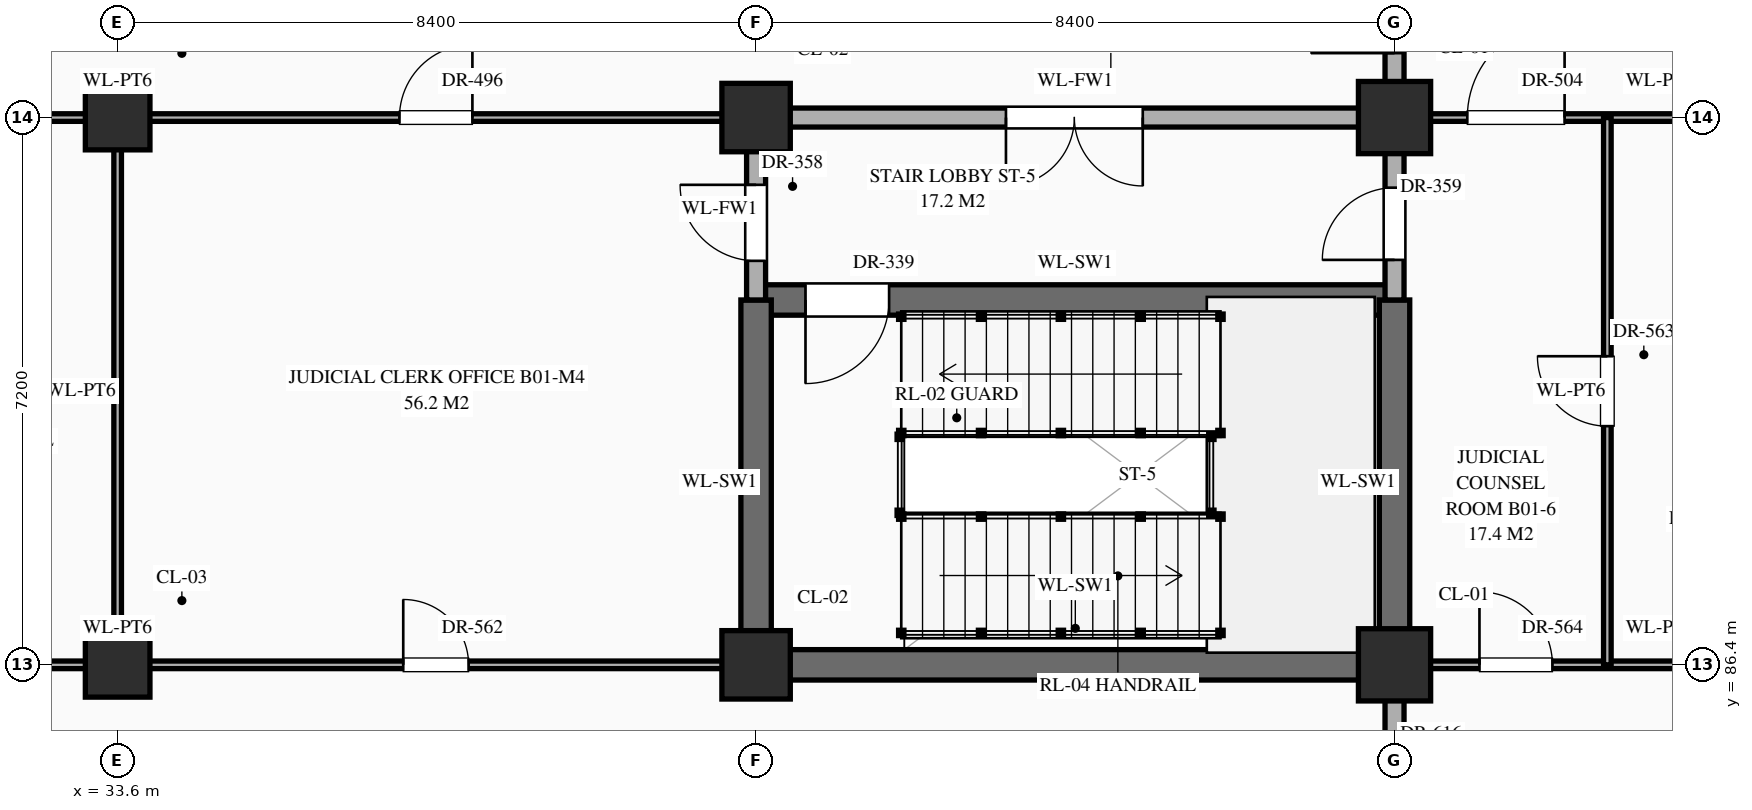
"""IFC4 building model, lengths in metres.
Left out: names, types, materials, properties, quantities, classifications, styles, units other than length and angle.
Written with IfcOpenShell. Run it as: python <this file> out.ifc"""

import sys

from ifc_helpers import new_model, si_unit, direction, frame, frame_2d, origin, origin_2d, place, context, subcontext, project, spatial, rectangle, extrude, element, fill, save


model = new_model("IFC4")
c1 = context("Model", 3, precision=1e-05, world=origin(), true_north=direction((0.0, 1.0)))
c2 = subcontext(c1, "Body", "Model", "MODEL_VIEW")
j1 = project(units=[si_unit("LENGTHUNIT", "METRE"), si_unit("PLANEANGLEUNIT", "RADIAN")], contexts=[c1])
p1 = place(None, origin())
s1 = spatial("IfcSite", under=j1, at=p1, CompositionType="ELEMENT")
p2 = place(p1, origin())
s2 = spatial("IfcBuilding", under=s1, at=p2, CompositionType="ELEMENT")
p3 = place(p2, frame((0.0, 0.0, -5.4)))
s3 = spatial("IfcBuildingStorey", under=s2, at=p3, CompositionType="ELEMENT", Elevation=-5.4)
for number, where, z_axis, x_axis in (
    (1, (33.6, 86.4, 0.0), (0.0, 0.0, 1.0), (1.0, 0.0, 0.0)),
    (2, (33.6, 93.6, 0.0), (0.0, 0.0, 1.0), (1.0, 0.0, 0.0)),
):
    element("IfcColumn", number, at=place(p3, frame(where, z_axis=z_axis, x_axis=x_axis)), inside=s3, PredefinedType="COLUMN", context=c2, shape_type="SweptSolid", body=[
        extrude(rectangle(XDim=0.85, YDim=0.85, at=origin_2d()), origin(), (0.0, 0.0, 1.0), 5.4),
    ])
for number, where, z_axis, x_axis in (
    (3, (42.0, 86.4, 0.0), (0.0, 0.0, 1.0), (1.0, 0.0, 0.0)),
    (4, (42.0, 93.6, 0.0), (0.0, 0.0, 1.0), (1.0, 0.0, 0.0)),
):
    element("IfcColumn", number, at=place(p3, frame(where, z_axis=z_axis, x_axis=x_axis)), inside=s3, PredefinedType="COLUMN", context=c2, shape_type="SweptSolid", body=[
        extrude(rectangle(XDim=0.9, YDim=0.9, at=origin_2d()), origin(), (0.0, 0.0, 1.0), 5.4),
    ])
for number, where, z_axis, x_axis in (
    (5, (50.4, 86.4, 0.0), (0.0, 0.0, 1.0), (1.0, 0.0, 0.0)),
    (6, (50.4, 93.6, 0.0), (0.0, 0.0, 1.0), (1.0, 0.0, 0.0)),
):
    element("IfcColumn", number, at=place(p3, frame(where, z_axis=z_axis, x_axis=x_axis)), inside=s3, PredefinedType="COLUMN", context=c2, shape_type="SweptSolid", body=[
        extrude(rectangle(XDim=0.95, YDim=0.95, at=origin_2d()), origin(), (0.0, 0.0, 1.0), 5.4),
    ])
p4 = place(p3, frame((25.2, 86.4, 0.0), z_axis=(0.0, 0.0, 1.0), x_axis=(1.0, 0.0, 0.0)))
e7 = element("IfcWall", 7, at=p4, inside=s3, PredefinedType="STANDARD", context=c2, shape_type="SweptSolid", body=[
    extrude(rectangle(XDim=16.8, YDim=0.1, at=frame_2d((8.4, 0.0))), origin(), (0.0, 0.0, 1.0), 4.25),
])
p5 = place(p4, frame((1.075, 0.0, 0.0)))
e8 = element("IfcOpeningElement", 8, at=p5, cuts=e7, PredefinedType="OPENING", context=c2, shape_type="SweptSolid", body=[
    extrude(rectangle(XDim=1.02, YDim=2.4, at=frame_2d((0.51, 1.2))), frame((0.0, 0.062, 0.0), z_axis=(0.0, -1.0, 0.0), x_axis=(1.0, 0.0, 0.0)), (0.0, 0.0, 1.0), 0.124),
])
p6 = place(p4, frame((3.425, 0.0, 0.0)))
e9 = element("IfcOpeningElement", 9, at=p6, cuts=e7, PredefinedType="OPENING", context=c2, shape_type="SweptSolid", body=[
    extrude(rectangle(XDim=1.55, YDim=2.35, at=frame_2d((0.775, 1.175))), frame((0.0, 0.062, 0.0), z_axis=(0.0, -1.0, 0.0), x_axis=(1.0, 0.0, 0.0)), (0.0, 0.0, 1.0), 0.124),
])
p7 = place(p4, frame((6.377, 0.0, 0.0)))
e10 = element("IfcOpeningElement", 10, at=p7, cuts=e7, PredefinedType="OPENING", context=c2, shape_type="SweptSolid", body=[
    extrude(rectangle(XDim=0.9, YDim=2.15, at=frame_2d((0.45, 1.075))), frame((0.0, 0.062, 0.0), z_axis=(0.0, -1.0, 0.0), x_axis=(1.0, 0.0, 0.0)), (0.0, 0.0, 1.0), 0.124),
])
p8 = place(p4, frame((12.157, 0.0, 0.0)))
e11 = element("IfcOpeningElement", 11, at=p8, cuts=e7, PredefinedType="OPENING", context=c2, shape_type="SweptSolid", body=[
    extrude(rectangle(XDim=0.86, YDim=2.1, at=frame_2d((0.43, 1.05))), frame((0.0, 0.062, 0.0), z_axis=(0.0, -1.0, 0.0), x_axis=(1.0, 0.0, 0.0)), (0.0, 0.0, 1.0), 0.124),
])
p9 = place(p3, frame((42.0, 86.4, 0.0), z_axis=(0.0, 0.0, 1.0), x_axis=(1.0, 0.0, 0.0)))
e12 = element("IfcWall", 12, at=p9, inside=s3, PredefinedType="SHEAR", context=c2, shape_type="SweptSolid", body=[
    extrude(rectangle(XDim=8.4, YDim=0.4, at=frame_2d((4.2, 0.0))), origin(), (0.0, 0.0, 1.0), 5.1),
])
p10 = place(p3, frame((50.4, 86.4, 0.0), z_axis=(0.0, 0.0, 1.0), x_axis=(1.0, 0.0, 0.0)))
e13 = element("IfcWall", 13, at=p10, inside=s3, PredefinedType="STANDARD", context=c2, shape_type="SweptSolid", body=[
    extrude(rectangle(XDim=8.4, YDim=0.1, at=frame_2d((4.2, 0.0))), origin(), (0.0, 0.0, 1.0), 4.25),
])
p11 = place(p10, frame((1.117, 0.0, 0.0)))
e14 = element("IfcOpeningElement", 14, at=p11, cuts=e13, PredefinedType="OPENING", context=c2, shape_type="SweptSolid", body=[
    extrude(rectangle(XDim=0.96, YDim=2.2, at=frame_2d((0.48, 1.1))), frame((0.0, 0.062, 0.0), z_axis=(0.0, -1.0, 0.0), x_axis=(1.0, 0.0, 0.0)), (0.0, 0.0, 1.0), 0.124),
])
p12 = place(p10, frame((3.68, 0.0, 0.0)))
e15 = element("IfcOpeningElement", 15, at=p12, cuts=e13, PredefinedType="OPENING", context=c2, shape_type="SweptSolid", body=[
    extrude(rectangle(XDim=1.04, YDim=2.2, at=frame_2d((0.52, 1.1))), frame((0.0, 0.062, 0.0), z_axis=(0.0, -1.0, 0.0), x_axis=(1.0, 0.0, 0.0)), (0.0, 0.0, 1.0), 0.124),
])
p13 = place(p10, frame((6.262, 0.0, 0.0)))
e16 = element("IfcOpeningElement", 16, at=p13, cuts=e13, PredefinedType="OPENING", context=c2, shape_type="SweptSolid", body=[
    extrude(rectangle(XDim=1.08, YDim=2.25, at=frame_2d((0.54, 1.125))), frame((0.0, 0.062, 0.0), z_axis=(0.0, -1.0, 0.0), x_axis=(1.0, 0.0, 0.0)), (0.0, 0.0, 1.0), 0.124),
])
p14 = place(p3, frame((42.0, 91.2, 0.0), z_axis=(0.0, 0.0, 1.0), x_axis=(1.0, 0.0, 0.0)))
e17 = element("IfcWall", 17, at=p14, inside=s3, PredefinedType="SHEAR", context=c2, shape_type="SweptSolid", body=[
    extrude(rectangle(XDim=8.4, YDim=0.4, at=frame_2d((4.2, 0.0))), origin(), (0.0, 0.0, 1.0), 5.1),
])
p15 = place(p14, frame((0.65, 0.0, 0.0)))
e18 = element("IfcOpeningElement", 18, at=p15, cuts=e17, PredefinedType="OPENING", context=c2, shape_type="SweptSolid", body=[
    extrude(rectangle(XDim=1.1, YDim=2.2, at=frame_2d((0.55, 1.1))), frame((0.0, 0.212, 0.0), z_axis=(0.0, -1.0, 0.0), x_axis=(1.0, 0.0, 0.0)), (0.0, 0.0, 1.0), 0.424),
])
p16 = place(p3, frame((25.2, 93.6, 0.0), z_axis=(0.0, 0.0, 1.0), x_axis=(1.0, 0.0, 0.0)))
e19 = element("IfcWall", 19, at=p16, inside=s3, PredefinedType="STANDARD", context=c2, shape_type="SweptSolid", body=[
    extrude(rectangle(XDim=16.8, YDim=0.1, at=frame_2d((8.4, 0.0))), origin(), (0.0, 0.0, 1.0), 4.25),
])
p17 = place(p16, frame((1.135, 0.0, 0.0)))
e20 = element("IfcOpeningElement", 20, at=p17, cuts=e19, PredefinedType="OPENING", context=c2, shape_type="SweptSolid", body=[
    extrude(rectangle(XDim=0.9, YDim=2.15, at=frame_2d((0.45, 1.075))), frame((0.0, 0.062, 0.0), z_axis=(0.0, -1.0, 0.0), x_axis=(1.0, 0.0, 0.0)), (0.0, 0.0, 1.0), 0.124),
])
p18 = place(p16, frame((3.425, 0.0, 0.0)))
e21 = element("IfcOpeningElement", 21, at=p18, cuts=e19, PredefinedType="OPENING", context=c2, shape_type="SweptSolid", body=[
    extrude(rectangle(XDim=1.55, YDim=2.35, at=frame_2d((0.775, 1.175))), frame((0.0, 0.062, 0.0), z_axis=(0.0, -1.0, 0.0), x_axis=(1.0, 0.0, 0.0)), (0.0, 0.0, 1.0), 0.124),
])
p19 = place(p16, frame((6.367, 0.0, 0.0)))
e22 = element("IfcOpeningElement", 22, at=p19, cuts=e19, PredefinedType="OPENING", context=c2, shape_type="SweptSolid", body=[
    extrude(rectangle(XDim=0.92, YDim=2.15, at=frame_2d((0.46, 1.075))), frame((0.0, 0.062, 0.0), z_axis=(0.0, -1.0, 0.0), x_axis=(1.0, 0.0, 0.0)), (0.0, 0.0, 1.0), 0.124),
])
p20 = place(p16, frame((12.107, 0.0, 0.0)))
e23 = element("IfcOpeningElement", 23, at=p20, cuts=e19, PredefinedType="OPENING", context=c2, shape_type="SweptSolid", body=[
    extrude(rectangle(XDim=0.96, YDim=2.2, at=frame_2d((0.48, 1.1))), frame((0.0, 0.062, 0.0), z_axis=(0.0, -1.0, 0.0), x_axis=(1.0, 0.0, 0.0)), (0.0, 0.0, 1.0), 0.124),
])
p21 = place(p3, frame((42.0, 93.6, 0.0), z_axis=(0.0, 0.0, 1.0), x_axis=(1.0, 0.0, 0.0)))
e24 = element("IfcWall", 24, at=p21, inside=s3, PredefinedType="STANDARD", context=c2, shape_type="SweptSolid", body=[
    extrude(rectangle(XDim=8.4, YDim=0.25, at=frame_2d((4.2, 0.0))), origin(), (0.0, 0.0, 1.0), 4.25),
])
p22 = place(p21, frame((3.288, 0.0, 0.0)))
e25 = element("IfcOpeningElement", 25, at=p22, cuts=e24, PredefinedType="OPENING", context=c2, shape_type="SweptSolid", body=[
    extrude(rectangle(XDim=1.8, YDim=2.35, at=frame_2d((0.9, 1.175))), frame((0.0, 0.137, 0.0), z_axis=(0.0, -1.0, 0.0), x_axis=(1.0, 0.0, 0.0)), (0.0, 0.0, 1.0), 0.274),
])
p23 = place(p3, frame((50.4, 93.6, 0.0), z_axis=(0.0, 0.0, 1.0), x_axis=(1.0, 0.0, 0.0)))
e26 = element("IfcWall", 26, at=p23, inside=s3, PredefinedType="STANDARD", context=c2, shape_type="SweptSolid", body=[
    extrude(rectangle(XDim=8.4, YDim=0.1, at=frame_2d((4.2, 0.0))), origin(), (0.0, 0.0, 1.0), 4.25),
])
p24 = place(p23, frame((0.958, 0.0, 0.0)))
e27 = element("IfcOpeningElement", 27, at=p24, cuts=e26, PredefinedType="OPENING", context=c2, shape_type="SweptSolid", body=[
    extrude(rectangle(XDim=1.28, YDim=2.35, at=frame_2d((0.64, 1.175))), frame((0.0, 0.062, 0.0), z_axis=(0.0, -1.0, 0.0), x_axis=(1.0, 0.0, 0.0)), (0.0, 0.0, 1.0), 0.124),
])
p25 = place(p23, frame((3.73, 0.0, 0.0)))
e28 = element("IfcOpeningElement", 28, at=p25, cuts=e26, PredefinedType="OPENING", context=c2, shape_type="SweptSolid", body=[
    extrude(rectangle(XDim=0.94, YDim=2.3, at=frame_2d((0.47, 1.15))), frame((0.0, 0.062, 0.0), z_axis=(0.0, -1.0, 0.0), x_axis=(1.0, 0.0, 0.0)), (0.0, 0.0, 1.0), 0.124),
])
p26 = place(p23, frame((6.312, 0.0, 0.0)))
e29 = element("IfcOpeningElement", 29, at=p26, cuts=e26, PredefinedType="OPENING", context=c2, shape_type="SweptSolid", body=[
    extrude(rectangle(XDim=0.98, YDim=2.35, at=frame_2d((0.49, 1.175))), frame((0.0, 0.062, 0.0), z_axis=(0.0, -1.0, 0.0), x_axis=(1.0, 0.0, 0.0)), (0.0, 0.0, 1.0), 0.124),
])
p27 = place(p3, frame((33.6, 86.4, 0.0), z_axis=(0.0, 0.0, 1.0), x_axis=(0.0, 1.0, 0.0)))
e30 = element("IfcWall", 30, at=p27, inside=s3, PredefinedType="STANDARD", context=c2, shape_type="SweptSolid", body=[
    extrude(rectangle(XDim=7.2, YDim=0.1, at=frame_2d((3.6, 0.0))), origin(), (0.0, 0.0, 1.0), 4.35),
])
p28 = place(p3, frame((42.0, 86.4, 0.0), z_axis=(0.0, 0.0, 1.0), x_axis=(0.0, 1.0, 0.0)))
e31 = element("IfcWall", 31, at=p28, inside=s3, PredefinedType="SHEAR", context=c2, shape_type="SweptSolid", body=[
    extrude(rectangle(XDim=4.8, YDim=0.4, at=frame_2d((2.4, 0.0))), origin(), (0.0, 0.0, 1.0), 5.1),
])
p29 = place(p3, frame((42.0, 91.2, 0.0), z_axis=(0.0, 0.0, 1.0), x_axis=(0.0, 1.0, 0.0)))
e32 = element("IfcWall", 32, at=p29, inside=s3, PredefinedType="STANDARD", context=c2, shape_type="SweptSolid", body=[
    extrude(rectangle(XDim=2.4, YDim=0.25, at=frame_2d((1.2, 0.0))), origin(), (0.0, 0.0, 1.0), 4.35),
])
p30 = place(p29, frame((0.515, 0.0, 0.0)))
e33 = element("IfcOpeningElement", 33, at=p30, cuts=e32, PredefinedType="OPENING", context=c2, shape_type="SweptSolid", body=[
    extrude(rectangle(XDim=1.0, YDim=2.2, at=frame_2d((0.5, 1.1))), frame((0.0, 0.137, 0.0), z_axis=(0.0, -1.0, 0.0), x_axis=(1.0, 0.0, 0.0)), (0.0, 0.0, 1.0), 0.274),
])
p31 = place(p3, frame((50.4, 43.2, 0.0), z_axis=(0.0, 0.0, 1.0), x_axis=(0.0, 1.0, 0.0)))
e34 = element("IfcWall", 34, at=p31, inside=s3, PredefinedType="STANDARD", context=c2, shape_type="SweptSolid", body=[
    extrude(rectangle(XDim=43.2, YDim=0.25, at=frame_2d((21.6, 0.0))), origin(), (0.0, 0.0, 1.0), 4.23),
])
p32 = place(p31, frame((41.302, 0.0, 0.0)))
e35 = element("IfcOpeningElement", 35, at=p32, cuts=e34, PredefinedType="OPENING", context=c2, shape_type="SweptSolid", body=[
    extrude(rectangle(XDim=1.0, YDim=2.2, at=frame_2d((0.5, 1.1))), frame((0.0, 0.137, 0.0), z_axis=(0.0, -1.0, 0.0), x_axis=(1.0, 0.0, 0.0)), (0.0, 0.0, 1.0), 0.274),
])
p33 = place(p3, frame((50.4, 86.4, 0.0), z_axis=(0.0, 0.0, 1.0), x_axis=(0.0, 1.0, 0.0)))
e36 = element("IfcWall", 36, at=p33, inside=s3, PredefinedType="SHEAR", context=c2, shape_type="SweptSolid", body=[
    extrude(rectangle(XDim=4.8, YDim=0.4, at=frame_2d((2.4, 0.0))), origin(), (0.0, 0.0, 1.0), 5.1),
])
p34 = place(p3, frame((50.4, 91.2, 0.0), z_axis=(0.0, 0.0, 1.0), x_axis=(0.0, 1.0, 0.0)))
e37 = element("IfcWall", 37, at=p34, inside=s3, PredefinedType="STANDARD", context=c2, shape_type="SweptSolid", body=[
    extrude(rectangle(XDim=13.2, YDim=0.25, at=frame_2d((6.6, 0.0))), origin(), (0.0, 0.0, 1.0), 4.35),
])
p35 = place(p34, frame((0.528, 0.0, 0.0)))
e38 = element("IfcOpeningElement", 38, at=p35, cuts=e37, PredefinedType="OPENING", context=c2, shape_type="SweptSolid", body=[
    extrude(rectangle(XDim=0.95, YDim=2.15, at=frame_2d((0.475, 1.075))), frame((0.0, 0.137, 0.0), z_axis=(0.0, -1.0, 0.0), x_axis=(1.0, 0.0, 0.0)), (0.0, 0.0, 1.0), 0.274),
])
p36 = place(p34, frame((10.448, 0.0, 0.0)))
e39 = element("IfcOpeningElement", 39, at=p36, cuts=e37, PredefinedType="OPENING", context=c2, shape_type="SweptSolid", body=[
    extrude(rectangle(XDim=1.1, YDim=2.2, at=frame_2d((0.55, 1.1))), frame((0.0, 0.137, 0.0), z_axis=(0.0, -1.0, 0.0), x_axis=(1.0, 0.0, 0.0)), (0.0, 0.0, 1.0), 0.274),
])
p37 = place(p34, frame((3.248, 0.0, 0.0)))
e40 = element("IfcOpeningElement", 40, at=p37, cuts=e37, PredefinedType="OPENING", context=c2, shape_type="SweptSolid", body=[
    extrude(rectangle(XDim=1.1, YDim=2.2, at=frame_2d((0.55, 1.1))), frame((0.0, 0.137, 0.0), z_axis=(0.0, -1.0, 0.0), x_axis=(1.0, 0.0, 0.0)), (0.0, 0.0, 1.0), 0.274),
])
p38 = place(p3, frame((53.2, 86.4, 0.0), z_axis=(0.0, 0.0, 1.0), x_axis=(0.0, 1.0, 0.0)))
e41 = element("IfcWall", 41, at=p38, inside=s3, PredefinedType="STANDARD", context=c2, shape_type="SweptSolid", body=[
    extrude(rectangle(XDim=7.2, YDim=0.1, at=frame_2d((3.6, 0.0))), origin(), (0.0, 0.0, 1.0), 5.1),
])
p39 = place(p38, frame((3.14, 0.0, 0.0)))
e42 = element("IfcOpeningElement", 42, at=p39, cuts=e41, PredefinedType="OPENING", context=c2, shape_type="SweptSolid", body=[
    extrude(rectangle(XDim=0.92, YDim=2.15, at=frame_2d((0.46, 1.075))), frame((0.0, 0.062, 0.0), z_axis=(0.0, -1.0, 0.0), x_axis=(1.0, 0.0, 0.0)), (0.0, 0.0, 1.0), 0.124),
])
p40 = place(p15, frame((1.1, 0.0, 0.0), z_axis=(0.0, 0.0, 1.0), x_axis=(-1.0, 0.0, 0.0)))
e43 = element("IfcDoor", 43, at=p40, inside=s3, OperationType="SINGLE_SWING_RIGHT", PredefinedType="DOOR", context=c2, shape_type="SweptSolid", body=[
    extrude(rectangle(XDim=1.1, YDim=2.2, at=frame_2d((0.55, 1.1))), frame((0.0, 0.025, 0.0), z_axis=(0.0, -1.0, 0.0), x_axis=(1.0, 0.0, 0.0)), (0.0, 0.0, 1.0), 0.05),
])
fill(e18, e43)
p41 = place(p22, frame((1.8, 0.0, 0.0), z_axis=(0.0, 0.0, 1.0), x_axis=(-1.0, 0.0, 0.0)))
e44 = element("IfcDoor", 44, at=p41, inside=s3, OperationType="DOUBLE_DOOR_SINGLE_SWING", PredefinedType="DOOR", context=c2, shape_type="SweptSolid", body=[
    extrude(rectangle(XDim=1.8, YDim=2.35, at=frame_2d((0.9, 1.175))), frame((0.0, 0.025, 0.0), z_axis=(0.0, -1.0, 0.0), x_axis=(1.0, 0.0, 0.0)), (0.0, 0.0, 1.0), 0.05),
])
fill(e25, e44)
p42 = place(p30, origin())
e45 = element("IfcDoor", 45, at=p42, inside=s3, OperationType="SINGLE_SWING_RIGHT", PredefinedType="DOOR", context=c2, shape_type="SweptSolid", body=[
    extrude(rectangle(XDim=1.0, YDim=2.2, at=frame_2d((0.5, 1.1))), frame((0.0, 0.025, 0.0), z_axis=(0.0, -1.0, 0.0), x_axis=(1.0, 0.0, 0.0)), (0.0, 0.0, 1.0), 0.05),
])
fill(e33, e45)
p43 = place(p35, origin())
e46 = element("IfcDoor", 46, at=p43, inside=s3, OperationType="SINGLE_SWING_LEFT", PredefinedType="DOOR", context=c2, shape_type="SweptSolid", body=[
    extrude(rectangle(XDim=0.95, YDim=2.15, at=frame_2d((0.475, 1.075))), frame((0.0, 0.025, 0.0), z_axis=(0.0, -1.0, 0.0), x_axis=(1.0, 0.0, 0.0)), (0.0, 0.0, 1.0), 0.05),
])
fill(e38, e46)
p44 = place(p37, origin())
e47 = element("IfcDoor", 47, at=p44, inside=s3, OperationType="SINGLE_SWING_LEFT", PredefinedType="DOOR", context=c2, shape_type="SweptSolid", body=[
    extrude(rectangle(XDim=1.1, YDim=2.2, at=frame_2d((0.55, 1.1))), frame((0.0, 0.025, 0.0), z_axis=(0.0, -1.0, 0.0), x_axis=(1.0, 0.0, 0.0)), (0.0, 0.0, 1.0), 0.05),
])
fill(e40, e47)
p45 = place(p20, origin())
e48 = element("IfcDoor", 48, at=p45, inside=s3, OperationType="SINGLE_SWING_RIGHT", PredefinedType="DOOR", context=c2, shape_type="SweptSolid", body=[
    extrude(rectangle(XDim=0.96, YDim=2.2, at=frame_2d((0.48, 1.1))), frame((0.0, 0.025, 0.0), z_axis=(0.0, -1.0, 0.0), x_axis=(1.0, 0.0, 0.0)), (0.0, 0.0, 1.0), 0.05),
])
fill(e23, e48)
p46 = place(p24, origin())
e49 = element("IfcDoor", 49, at=p46, inside=s3, OperationType="SINGLE_SWING_RIGHT", PredefinedType="DOOR", context=c2, shape_type="SweptSolid", body=[
    extrude(rectangle(XDim=1.28, YDim=2.35, at=frame_2d((0.64, 1.175))), frame((0.0, 0.025, 0.0), z_axis=(0.0, -1.0, 0.0), x_axis=(1.0, 0.0, 0.0)), (0.0, 0.0, 1.0), 0.05),
])
fill(e27, e49)
p47 = place(p8, origin())
e50 = element("IfcDoor", 50, at=p47, inside=s3, OperationType="SINGLE_SWING_LEFT", PredefinedType="DOOR", context=c2, shape_type="SweptSolid", body=[
    extrude(rectangle(XDim=0.86, YDim=2.1, at=frame_2d((0.43, 1.05))), frame((0.0, 0.025, 0.0), z_axis=(0.0, -1.0, 0.0), x_axis=(1.0, 0.0, 0.0)), (0.0, 0.0, 1.0), 0.05),
])
fill(e11, e50)
p48 = place(p39, origin())
e51 = element("IfcDoor", 51, at=p48, inside=s3, OperationType="SINGLE_SWING_RIGHT", PredefinedType="DOOR", context=c2, shape_type="SweptSolid", body=[
    extrude(rectangle(XDim=0.92, YDim=2.15, at=frame_2d((0.46, 1.075))), frame((0.0, 0.025, 0.0), z_axis=(0.0, -1.0, 0.0), x_axis=(1.0, 0.0, 0.0)), (0.0, 0.0, 1.0), 0.05),
])
fill(e42, e51)
p49 = place(p11, origin())
e52 = element("IfcDoor", 52, at=p49, inside=s3, OperationType="SINGLE_SWING_LEFT", PredefinedType="DOOR", context=c2, shape_type="SweptSolid", body=[
    extrude(rectangle(XDim=0.96, YDim=2.2, at=frame_2d((0.48, 1.1))), frame((0.0, 0.025, 0.0), z_axis=(0.0, -1.0, 0.0), x_axis=(1.0, 0.0, 0.0)), (0.0, 0.0, 1.0), 0.05),
])
fill(e14, e52)
save(model, sys.argv[1])
